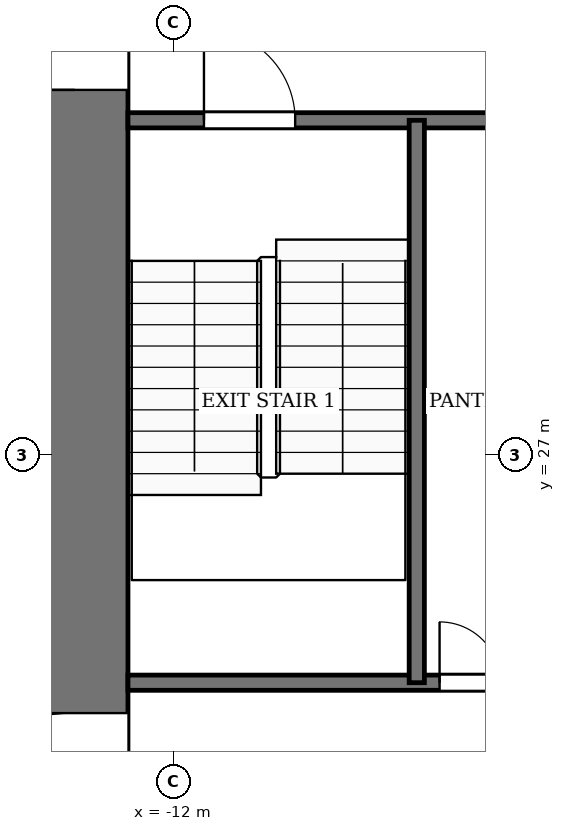
"""IFC4 building model, lengths in metres.
Left out: names, types, materials, properties, quantities, classifications, styles, units other than length and angle.
Written with IfcOpenShell. Run it as: python <this file> out.ifc"""

import sys

from ifc_helpers import new_model, si_unit, direction, frame, frame_2d, origin, place, context, subcontext, project, spatial, rectangle, extrude, element, fill, save


model = new_model("IFC4")
c1 = context("Model", 3, precision=1e-05, world=origin(), true_north=direction((0.0, 1.0)))
c2 = subcontext(c1, "Body", "Model", "MODEL_VIEW")
j1 = project(units=[si_unit("LENGTHUNIT", "METRE"), si_unit("PLANEANGLEUNIT", "RADIAN")], contexts=[c1])
p1 = place(None, origin())
s1 = spatial("IfcSite", under=j1, at=p1, CompositionType="ELEMENT")
p2 = place(p1, origin())
s2 = spatial("IfcBuilding", under=s1, at=p2, CompositionType="ELEMENT")
p3 = place(p2, frame((0.0, 0.0, 18.0)))
s3 = spatial("IfcBuildingStorey", under=s2, at=p3, CompositionType="ELEMENT", Elevation=18.0)
p4 = place(p3, frame((-13.3, 18.4, -0.13), z_axis=(0.0, 0.0, 1.0), x_axis=(0.0, 1.0, 0.0)))
e1 = element("IfcWall", 1, at=p4, inside=s3, PredefinedType="SHEAR", context=c2, shape_type="SweptSolid", body=[
    extrude(rectangle(XDim=19.2, YDim=1.4, at=frame_2d((9.6, 0.0))), origin(), (0.0, 0.0, 1.0), 4.0),
])
p5 = place(p4, frame((2.8, 0.0, 0.13)))
e2 = element("IfcOpeningElement", 2, at=p5, cuts=e1, PredefinedType="OPENING", context=c2, shape_type="SweptSolid", body=[
    extrude(rectangle(XDim=2.4, YDim=2.4, at=frame_2d((1.2, 1.2))), frame((0.0, 0.71, 0.0), z_axis=(0.0, -1.0, 0.0), x_axis=(1.0, 0.0, 0.0)), (0.0, 0.0, 1.0), 1.42),
])
p6 = place(p4, frame((13.4, 0.0, 0.13)))
e3 = element("IfcOpeningElement", 3, at=p6, cuts=e1, PredefinedType="OPENING", context=c2, shape_type="SweptSolid", body=[
    extrude(rectangle(XDim=1.4, YDim=2.2, at=frame_2d((0.7, 1.1))), frame((0.0, 0.71, 0.0), z_axis=(0.0, -1.0, 0.0), x_axis=(1.0, 0.0, 0.0)), (0.0, 0.0, 1.0), 1.42),
])
p7 = place(p3, frame((-12.6, 24.0, 0.0), z_axis=(0.0, 0.0, 1.0), x_axis=(1.0, 0.0, 0.0)))
e4 = element("IfcWall", 4, at=p7, inside=s3, PredefinedType="PARTITIONING", context=c2, shape_type="SweptSolid", body=[
    extrude(rectangle(XDim=6.6, YDim=0.2, at=frame_2d((3.3, 0.0))), origin(), (0.0, 0.0, 1.0), 3.87),
])
p8 = place(p7, frame((4.1, 0.0, 0.0)))
e5 = element("IfcOpeningElement", 5, at=p8, cuts=e4, PredefinedType="OPENING", context=c2, shape_type="SweptSolid", body=[
    extrude(rectangle(XDim=0.8, YDim=2.1, at=frame_2d((0.4, 1.05))), frame((0.0, 0.11, 0.0), z_axis=(0.0, -1.0, 0.0), x_axis=(1.0, 0.0, 0.0)), (0.0, 0.0, 1.0), 0.22),
])
p9 = place(p7, frame((5.5, 0.0, 0.0)))
e6 = element("IfcOpeningElement", 6, at=p9, cuts=e4, PredefinedType="OPENING", context=c2, shape_type="SweptSolid", body=[
    extrude(rectangle(XDim=0.8, YDim=2.1, at=frame_2d((0.4, 1.05))), frame((0.0, 0.11, 0.0), z_axis=(0.0, -1.0, 0.0), x_axis=(1.0, 0.0, 0.0)), (0.0, 0.0, 1.0), 0.22),
])
p10 = place(p3, frame((-12.6, 31.4, 0.0), z_axis=(0.0, 0.0, 1.0), x_axis=(1.0, 0.0, 0.0)))
e7 = element("IfcWall", 7, at=p10, inside=s3, PredefinedType="PARTITIONING", context=c2, shape_type="SweptSolid", body=[
    extrude(rectangle(XDim=6.6, YDim=0.2, at=frame_2d((3.3, 0.0))), origin(), (0.0, 0.0, 1.0), 3.87),
])
p11 = place(p10, frame((1.0, 0.0, 0.0)))
e8 = element("IfcOpeningElement", 8, at=p11, cuts=e7, PredefinedType="OPENING", context=c2, shape_type="SweptSolid", body=[
    extrude(rectangle(XDim=1.2, YDim=2.2, at=frame_2d((0.6, 1.1))), frame((0.0, 0.11, 0.0), z_axis=(0.0, -1.0, 0.0), x_axis=(1.0, 0.0, 0.0)), (0.0, 0.0, 1.0), 0.22),
])
p12 = place(p3, frame((-8.8, 24.0, 0.0), z_axis=(0.0, 0.0, 1.0), x_axis=(0.0, 1.0, 0.0)))
e9 = element("IfcWall", 9, at=p12, inside=s3, PredefinedType="PARTITIONING", context=c2, shape_type="SweptSolid", body=[
    extrude(rectangle(XDim=7.4, YDim=0.2, at=frame_2d((3.7, 0.0))), origin(), (0.0, 0.0, 1.0), 3.87),
])
p13 = place(p8, origin())
e10 = element("IfcDoor", 10, at=p13, inside=s3, OperationType="SINGLE_SWING_LEFT", PredefinedType="DOOR", context=c2, shape_type="SweptSolid", body=[
    extrude(rectangle(XDim=0.8, YDim=2.1, at=frame_2d((0.4, 1.05))), frame((0.0, 0.025, 0.0), z_axis=(0.0, -1.0, 0.0), x_axis=(1.0, 0.0, 0.0)), (0.0, 0.0, 1.0), 0.05),
])
fill(e5, e10)
p14 = place(p11, origin())
e11 = element("IfcDoor", 11, at=p14, inside=s3, OperationType="SINGLE_SWING_RIGHT", PredefinedType="DOOR", context=c2, shape_type="SweptSolid", body=[
    extrude(rectangle(XDim=1.2, YDim=2.2, at=frame_2d((0.6, 1.1))), frame((0.0, 0.025, 0.0), z_axis=(0.0, -1.0, 0.0), x_axis=(1.0, 0.0, 0.0)), (0.0, 0.0, 1.0), 0.05),
])
fill(e8, e11)
p15 = place(p5, origin())
e12 = element("IfcDoor", 12, at=p15, inside=s3, OperationType="DOUBLE_DOOR_SINGLE_SWING", PredefinedType="DOOR", context=c2, shape_type="SweptSolid", body=[
    extrude(rectangle(XDim=2.4, YDim=2.4, at=frame_2d((1.2, 1.2))), frame((0.0, 0.025, 0.0), z_axis=(0.0, -1.0, 0.0), x_axis=(1.0, 0.0, 0.0)), (0.0, 0.0, 1.0), 0.05),
])
fill(e2, e12)
p16 = place(p6, origin())
e13 = element("IfcDoor", 13, at=p16, inside=s3, OperationType="SINGLE_SWING_RIGHT", PredefinedType="DOOR", context=c2, shape_type="SweptSolid", body=[
    extrude(rectangle(XDim=1.4, YDim=2.2, at=frame_2d((0.7, 1.1))), frame((0.0, 0.025, 0.0), z_axis=(0.0, -1.0, 0.0), x_axis=(1.0, 0.0, 0.0)), (0.0, 0.0, 1.0), 0.05),
])
fill(e3, e13)
save(model, sys.argv[1])
